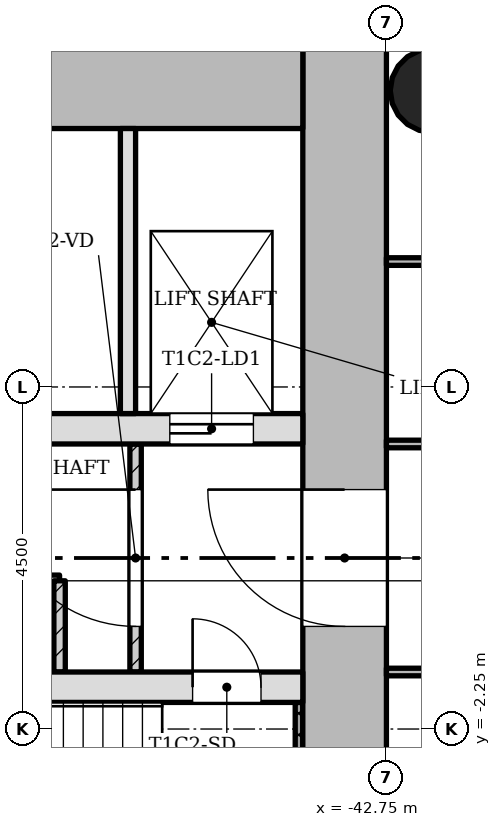
"""IFC4 building model, lengths in metres.
Left out: names, types, materials, properties, quantities, classifications, styles, units other than length and angle.
Written with IfcOpenShell. Run it as: python <this file> out.ifc"""

import sys

from ifc_helpers import new_model, si_unit, direction, frame, frame_2d, origin, origin_2d, place, context, subcontext, project, spatial, rectangle, hollow_circle, extrude, element, fill, save


model = new_model("IFC4")
c1 = context("Model", 3, precision=1e-05, world=origin(), true_north=direction((0.0, 1.0)))
c2 = subcontext(c1, "Body", "Model", "MODEL_VIEW")
j1 = project(units=[si_unit("LENGTHUNIT", "METRE"), si_unit("PLANEANGLEUNIT", "RADIAN")], contexts=[c1])
p1 = place(None, origin())
s1 = spatial("IfcSite", under=j1, at=p1, CompositionType="ELEMENT")
p2 = place(p1, origin())
s2 = spatial("IfcBuilding", under=s1, at=p2, CompositionType="ELEMENT")
p3 = place(p2, frame((0.0, 0.0, 55.1)))
s3 = spatial("IfcBuildingStorey", under=s2, at=p3, CompositionType="ELEMENT", Elevation=55.1)
p4 = place(p3, frame((-43.3, -5.65, 0.0), z_axis=(0.0, 0.0, 1.0), x_axis=(0.0, 1.0, 0.0)))
e1 = element("IfcWall", 1, at=p4, inside=s3, PredefinedType="SHEAR", context=c2, shape_type="SweptSolid", body=[
    extrude(rectangle(XDim=12.4, YDim=1.1, at=frame_2d((6.2, 0.0))), origin(), (0.0, 0.0, 1.0), 3.4),
])
p5 = place(p4, frame((4.75, 0.0, 0.0)))
e2 = element("IfcOpeningElement", 2, at=p5, cuts=e1, PredefinedType="OPENING", context=c2, shape_type="SweptSolid", body=[
    extrude(rectangle(XDim=1.8, YDim=2.1, at=frame_2d((0.9, 1.05))), frame((0.0, 0.56, 0.0), z_axis=(0.0, -1.0, 0.0), x_axis=(1.0, 0.0, 0.0)), (0.0, 0.0, 1.0), 1.12),
])
p6 = place(p3, frame((-43.85, 6.2, 0.0), z_axis=(0.0, 0.0, 1.0), x_axis=(-1.0, 0.0, 0.0)))
e3 = element("IfcWall", 3, at=p6, inside=s3, PredefinedType="SHEAR", context=c2, shape_type="SweptSolid", body=[
    extrude(rectangle(XDim=7.9, YDim=1.1, at=frame_2d((3.95, 0.0))), origin(), (0.0, 0.0, 1.0), 3.4),
])
p7 = place(p3, frame((-50.65, -1.7, 0.0), z_axis=(0.0, 0.0, 1.0), x_axis=(1.0, 0.0, 0.0)))
e4 = element("IfcWall", 4, at=p7, inside=s3, PredefinedType="SHEAR", context=c2, shape_type="SweptSolid", body=[
    extrude(rectangle(XDim=6.8, YDim=0.4, at=frame_2d((3.4, 0.0))), origin(), (0.0, 0.0, 1.0), 3.4),
])
p8 = place(p7, frame((5.35, 0.0, 0.0)))
e5 = element("IfcOpeningElement", 5, at=p8, cuts=e4, PredefinedType="OPENING", context=c2, shape_type="SweptSolid", body=[
    extrude(rectangle(XDim=0.9, YDim=2.1, at=frame_2d((0.45, 1.05))), frame((0.0, 0.21, 0.0), z_axis=(0.0, -1.0, 0.0), x_axis=(1.0, 0.0, 0.0)), (0.0, 0.0, 1.0), 0.42),
])
p9 = place(p3, frame((-50.65, 1.7, 0.0), z_axis=(0.0, 0.0, 1.0), x_axis=(1.0, 0.0, 0.0)))
e6 = element("IfcWall", 6, at=p9, inside=s3, PredefinedType="SHEAR", context=c2, shape_type="SweptSolid", body=[
    extrude(rectangle(XDim=6.8, YDim=0.4, at=frame_2d((3.4, 0.0))), origin(), (0.0, 0.0, 1.0), 3.4),
])
p10 = place(p9, frame((5.05, 0.0, 0.0)))
e7 = element("IfcOpeningElement", 7, at=p10, cuts=e6, PredefinedType="OPENING", context=c2, shape_type="SweptSolid", body=[
    extrude(rectangle(XDim=1.1, YDim=2.1, at=frame_2d((0.55, 1.05))), frame((0.0, 0.21, 0.0), z_axis=(0.0, -1.0, 0.0), x_axis=(1.0, 0.0, 0.0)), (0.0, 0.0, 1.0), 0.42),
])
p11 = place(p3, frame((-42.15, 6.15, 0.0), z_axis=(0.0, 0.0, 1.0), x_axis=(1.0, 0.0, 0.0)))
e8 = element("IfcColumn", 8, at=p11, inside=s3, PredefinedType="COLUMN", context=c2, shape_type="SweptSolid", body=[
    extrude(hollow_circle(Radius=0.55, WallThickness=0.04, at=origin_2d()), origin(), (0.0, 0.0, 1.0), 3.4),
])
p12 = place(p3, frame((-46.05, 1.5, 0.0), z_axis=(0.0, 0.0, 1.0), x_axis=(0.0, -1.0, 0.0)))
e9 = element("IfcWall", 9, at=p12, inside=s3, PredefinedType="PARTITIONING", context=c2, shape_type="SweptSolid", body=[
    extrude(rectangle(XDim=3.0, YDim=0.15, at=frame_2d((1.5, 0.0))), origin(), (0.0, 0.0, 1.0), 3.0),
])
p13 = place(p12, frame((0.6, 0.0, 0.0)))
e10 = element("IfcOpeningElement", 10, at=p13, cuts=e9, PredefinedType="OPENING", context=c2, shape_type="SweptSolid", body=[
    extrude(rectangle(XDim=1.8, YDim=2.1, at=frame_2d((0.9, 1.05))), frame((0.0, 0.085, 0.0), z_axis=(0.0, -1.0, 0.0), x_axis=(1.0, 0.0, 0.0)), (0.0, 0.0, 1.0), 0.17),
])
p14 = place(p3, frame((-46.15, 5.65, 0.0), z_axis=(0.0, 0.0, 1.0), x_axis=(0.0, -1.0, 0.0)))
e11 = element("IfcWall", 11, at=p14, inside=s3, PredefinedType="SOLIDWALL", context=c2, shape_type="SweptSolid", body=[
    extrude(rectangle(XDim=3.75, YDim=0.2, at=frame_2d((1.875, 0.0))), origin(), (0.0, 0.0, 1.0), 3.0),
])
p15 = place(p3, frame((-47.05, -0.3, 0.0), z_axis=(0.0, 0.0, 1.0), x_axis=(-1.0, 0.0, 0.0)))
e12 = element("IfcWall", 12, at=p15, inside=s3, PredefinedType="PARTITIONING", context=c2, shape_type="SweptSolid", body=[
    extrude(rectangle(XDim=2.4, YDim=0.15, at=frame_2d((1.2, 0.0))), origin(), (0.0, 0.0, 1.0), 3.0),
])
p16 = place(p15, frame((0.75, 0.0, 0.0)))
e13 = element("IfcOpeningElement", 13, at=p16, cuts=e12, PredefinedType="OPENING", context=c2, shape_type="SweptSolid", body=[
    extrude(rectangle(XDim=0.9, YDim=2.1, at=frame_2d((0.45, 1.05))), frame((0.0, 0.085, 0.0), z_axis=(0.0, -1.0, 0.0), x_axis=(1.0, 0.0, 0.0)), (0.0, 0.0, 1.0), 0.17),
])
p17 = place(p3, frame((-47.05, -0.3, 0.0), z_axis=(0.0, 0.0, 1.0), x_axis=(0.0, -1.0, 0.0)))
e14 = element("IfcWall", 14, at=p17, inside=s3, PredefinedType="PARTITIONING", context=c2, shape_type="SweptSolid", body=[
    extrude(rectangle(XDim=1.2, YDim=0.15, at=frame_2d((0.6, 0.0))), origin(), (0.0, 0.0, 1.0), 3.0),
])
p18 = place(p3, frame((-42.75, -1.5, 0.0), z_axis=(0.0, 0.0, 1.0), x_axis=(1.0, 0.0, 0.0)))
e15 = element("IfcWall", 15, at=p18, inside=s3, PredefinedType="PARTITIONING", context=c2, shape_type="SweptSolid", body=[
    extrude(rectangle(XDim=5.85, YDim=0.1, at=frame_2d((2.925, 0.0))), origin(), (0.0, 0.0, 1.0), 3.0),
])
p19 = place(p18, frame((2.475, 0.0, 0.0)))
e16 = element("IfcOpeningElement", 16, at=p19, cuts=e15, PredefinedType="OPENING", context=c2, shape_type="SweptSolid", body=[
    extrude(rectangle(XDim=0.9, YDim=2.1, at=frame_2d((0.45, 1.05))), frame((0.0, 0.06, 0.0), z_axis=(0.0, -1.0, 0.0), x_axis=(1.0, 0.0, 0.0)), (0.0, 0.0, 1.0), 0.12),
])
p20 = place(p3, frame((-42.75, 1.5, 0.0), z_axis=(0.0, 0.0, 1.0), x_axis=(1.0, 0.0, 0.0)))
e17 = element("IfcWall", 17, at=p20, inside=s3, PredefinedType="PARTITIONING", context=c2, shape_type="SweptSolid", body=[
    extrude(rectangle(XDim=5.85, YDim=0.1, at=frame_2d((2.925, 0.0))), origin(), (0.0, 0.0, 1.0), 3.0),
])
p21 = place(p20, frame((1.575, 0.0, 0.0)))
e18 = element("IfcOpeningElement", 18, at=p21, cuts=e17, PredefinedType="OPENING", context=c2, shape_type="SweptSolid", body=[
    extrude(rectangle(XDim=0.9, YDim=2.1, at=frame_2d((0.45, 1.05))), frame((0.0, 0.06, 0.0), z_axis=(0.0, -1.0, 0.0), x_axis=(1.0, 0.0, 0.0)), (0.0, 0.0, 1.0), 0.12),
])
p22 = place(p3, frame((-42.75, 3.9, 0.0), z_axis=(0.0, 0.0, 1.0), x_axis=(1.0, 0.0, 0.0)))
e19 = element("IfcWall", 19, at=p22, inside=s3, PredefinedType="PARTITIONING", context=c2, shape_type="SweptSolid", body=[
    extrude(rectangle(XDim=5.85, YDim=0.1, at=frame_2d((2.925, 0.0))), origin(), (0.0, 0.0, 1.0), 3.0),
])
p23 = place(p3, frame((-43.9, -1.9, 0.0), z_axis=(0.0, 0.0, 1.0), x_axis=(0.0, -1.0, 0.0)))
e20 = element("IfcWall", 20, at=p23, inside=s3, PredefinedType="SHEAR", context=c2, shape_type="SweptSolid", body=[
    extrude(rectangle(XDim=3.75, YDim=0.1, at=frame_2d((1.875, 0.0))), origin(), (0.0, 0.0, 1.0), 3.4),
])
p24 = place(p13, origin())
e21 = element("IfcDoor", 21, at=p24, inside=s3, OperationType="SINGLE_SWING_LEFT", PredefinedType="DOOR", context=c2, shape_type="SweptSolid", body=[
    extrude(rectangle(XDim=1.8, YDim=2.1, at=frame_2d((0.9, 1.05))), frame((0.0, 0.025, 0.0), z_axis=(0.0, -1.0, 0.0), x_axis=(1.0, 0.0, 0.0)), (0.0, 0.0, 1.0), 0.05),
])
fill(e10, e21)
p25 = place(p8, origin())
e22 = element("IfcDoor", 22, at=p25, inside=s3, OperationType="SINGLE_SWING_RIGHT", PredefinedType="DOOR", context=c2, shape_type="SweptSolid", body=[
    extrude(rectangle(XDim=0.9, YDim=2.1, at=frame_2d((0.45, 1.05))), frame((0.0, 0.025, 0.0), z_axis=(0.0, -1.0, 0.0), x_axis=(1.0, 0.0, 0.0)), (0.0, 0.0, 1.0), 0.05),
])
fill(e5, e22)
p26 = place(p10, origin())
e23 = element("IfcDoor", 23, at=p26, inside=s3, OperationType="SLIDING_TO_LEFT", PredefinedType="DOOR", context=c2, shape_type="SweptSolid", body=[
    extrude(rectangle(XDim=1.1, YDim=2.1, at=frame_2d((0.55, 1.05))), frame((0.0, 0.025, 0.0), z_axis=(0.0, -1.0, 0.0), x_axis=(1.0, 0.0, 0.0)), (0.0, 0.0, 1.0), 0.05),
])
fill(e7, e23)
p27 = place(p5, origin())
e24 = element("IfcDoor", 24, at=p27, inside=s3, OperationType="SINGLE_SWING_LEFT", PredefinedType="DOOR", context=c2, shape_type="SweptSolid", body=[
    extrude(rectangle(XDim=1.8, YDim=2.1, at=frame_2d((0.9, 1.05))), frame((0.0, 0.025, 0.0), z_axis=(0.0, -1.0, 0.0), x_axis=(1.0, 0.0, 0.0)), (0.0, 0.0, 1.0), 0.05),
])
fill(e2, e24)
save(model, sys.argv[1])
